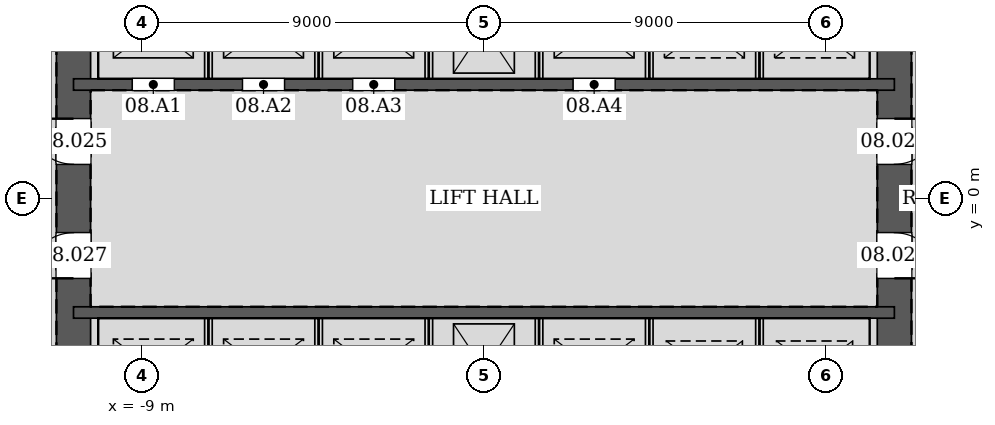
"""IFC4 building model, lengths in metres.
Left out: names, types, materials, properties, quantities, classifications, styles, units other than length and angle.
Written with IfcOpenShell. Run it as: python <this file> out.ifc"""

import sys

from ifc_helpers import new_model, si_unit, direction, frame, frame_2d, origin, place, context, subcontext, project, spatial, rectangle, extrude, element, fill, save


model = new_model("IFC4")
c1 = context("Model", 3, precision=1e-05, world=origin(), true_north=direction((0.0, 1.0)))
c2 = subcontext(c1, "Body", "Model", "MODEL_VIEW")
j1 = project(units=[si_unit("LENGTHUNIT", "METRE"), si_unit("PLANEANGLEUNIT", "RADIAN")], contexts=[c1])
p1 = place(None, origin())
s1 = spatial("IfcSite", under=j1, at=p1, CompositionType="ELEMENT")
p2 = place(p1, origin())
s2 = spatial("IfcBuilding", under=s1, at=p2, CompositionType="ELEMENT")
p3 = place(p2, frame((0.0, 0.0, 41.4)))
s3 = spatial("IfcBuildingStorey", under=s2, at=p3, CompositionType="ELEMENT", Elevation=41.4)
p4 = place(p3, frame((10.8, -10.8, 0.0), z_axis=(0.0, 0.0, 1.0), x_axis=(0.0, 1.0, 0.0)))
e1 = element("IfcWall", 1, at=p4, inside=s3, PredefinedType="SOLIDWALL", context=c2, shape_type="SweptSolid", body=[
    extrude(rectangle(XDim=21.6, YDim=0.9, at=frame_2d((10.8, 0.0))), origin(), (0.0, 0.0, 1.0), 4.2),
])
p5 = place(p4, frame((11.7, 0.0, 0.0)))
e2 = element("IfcOpeningElement", 2, at=p5, cuts=e1, PredefinedType="OPENING", context=c2, shape_type="SweptSolid", body=[
    extrude(rectangle(XDim=1.2, YDim=2.1, at=frame_2d((0.6, 1.05))), frame((0.0, 0.46, 0.0), z_axis=(0.0, -1.0, 0.0), x_axis=(1.0, 0.0, 0.0)), (0.0, 0.0, 1.0), 0.92),
])
p6 = place(p4, frame((8.7, 0.0, 0.0)))
e3 = element("IfcOpeningElement", 3, at=p6, cuts=e1, PredefinedType="OPENING", context=c2, shape_type="SweptSolid", body=[
    extrude(rectangle(XDim=1.2, YDim=2.1, at=frame_2d((0.6, 1.05))), frame((0.0, 0.46, 0.0), z_axis=(0.0, -1.0, 0.0), x_axis=(1.0, 0.0, 0.0)), (0.0, 0.0, 1.0), 0.92),
])
p7 = place(p3, frame((-10.8, 10.8, 0.0), z_axis=(0.0, 0.0, 1.0), x_axis=(0.0, -1.0, 0.0)))
e4 = element("IfcWall", 4, at=p7, inside=s3, PredefinedType="SOLIDWALL", context=c2, shape_type="SweptSolid", body=[
    extrude(rectangle(XDim=21.6, YDim=0.9, at=frame_2d((10.8, 0.0))), origin(), (0.0, 0.0, 1.0), 4.2),
])
p8 = place(p7, frame((8.7, 0.0, 0.0)))
e5 = element("IfcOpeningElement", 5, at=p8, cuts=e4, PredefinedType="OPENING", context=c2, shape_type="SweptSolid", body=[
    extrude(rectangle(XDim=1.2, YDim=2.1, at=frame_2d((0.6, 1.05))), frame((0.0, 0.46, 0.0), z_axis=(0.0, -1.0, 0.0), x_axis=(1.0, 0.0, 0.0)), (0.0, 0.0, 1.0), 0.92),
])
p9 = place(p7, frame((11.7, 0.0, 0.0)))
e6 = element("IfcOpeningElement", 6, at=p9, cuts=e4, PredefinedType="OPENING", context=c2, shape_type="SweptSolid", body=[
    extrude(rectangle(XDim=1.2, YDim=2.1, at=frame_2d((0.6, 1.05))), frame((0.0, 0.46, 0.0), z_axis=(0.0, -1.0, 0.0), x_axis=(1.0, 0.0, 0.0)), (0.0, 0.0, 1.0), 0.92),
])
p10 = place(p3, frame((-10.8, 3.0, 0.0), z_axis=(0.0, 0.0, 1.0), x_axis=(1.0, 0.0, 0.0)))
e7 = element("IfcWall", 7, at=p10, inside=s3, PredefinedType="SOLIDWALL", context=c2, shape_type="SweptSolid", body=[
    extrude(rectangle(XDim=21.6, YDim=0.3, at=frame_2d((10.8, 0.0))), origin(), (0.0, 0.0, 1.0), 4.2),
])
p11 = place(p10, frame((1.55, 0.0, 0.0)))
e8 = element("IfcOpeningElement", 8, at=p11, cuts=e7, PredefinedType="OPENING", context=c2, shape_type="SweptSolid", body=[
    extrude(rectangle(XDim=1.1, YDim=2.1, at=frame_2d((0.55, 1.05))), frame((0.0, 0.16, 0.0), z_axis=(0.0, -1.0, 0.0), x_axis=(1.0, 0.0, 0.0)), (0.0, 0.0, 1.0), 0.32),
])
p12 = place(p10, frame((4.45, 0.0, 0.0)))
e9 = element("IfcOpeningElement", 9, at=p12, cuts=e7, PredefinedType="OPENING", context=c2, shape_type="SweptSolid", body=[
    extrude(rectangle(XDim=1.1, YDim=2.1, at=frame_2d((0.55, 1.05))), frame((0.0, 0.16, 0.0), z_axis=(0.0, -1.0, 0.0), x_axis=(1.0, 0.0, 0.0)), (0.0, 0.0, 1.0), 0.32),
])
p13 = place(p10, frame((7.35, 0.0, 0.0)))
e10 = element("IfcOpeningElement", 10, at=p13, cuts=e7, PredefinedType="OPENING", context=c2, shape_type="SweptSolid", body=[
    extrude(rectangle(XDim=1.1, YDim=2.1, at=frame_2d((0.55, 1.05))), frame((0.0, 0.16, 0.0), z_axis=(0.0, -1.0, 0.0), x_axis=(1.0, 0.0, 0.0)), (0.0, 0.0, 1.0), 0.32),
])
p14 = place(p10, frame((13.15, 0.0, 0.0)))
e11 = element("IfcOpeningElement", 11, at=p14, cuts=e7, PredefinedType="OPENING", context=c2, shape_type="SweptSolid", body=[
    extrude(rectangle(XDim=1.1, YDim=2.1, at=frame_2d((0.55, 1.05))), frame((0.0, 0.16, 0.0), z_axis=(0.0, -1.0, 0.0), x_axis=(1.0, 0.0, 0.0)), (0.0, 0.0, 1.0), 0.32),
])
p15 = place(p3, frame((-10.8, -3.0, 0.0), z_axis=(0.0, 0.0, 1.0), x_axis=(1.0, 0.0, 0.0)))
e12 = element("IfcWall", 12, at=p15, inside=s3, PredefinedType="SOLIDWALL", context=c2, shape_type="SweptSolid", body=[
    extrude(rectangle(XDim=21.6, YDim=0.3, at=frame_2d((10.8, 0.0))), origin(), (0.0, 0.0, 1.0), 4.2),
])
for number, where, z_axis, x_axis in (
    (13, (-7.25, 3.15, 0.0), (0.0, 0.0, 1.0), (0.0, 1.0, 0.0)),
    (14, (-4.35, 3.15, 0.0), (0.0, 0.0, 1.0), (0.0, 1.0, 0.0)),
    (15, (-1.45, 3.15, 0.0), (0.0, 0.0, 1.0), (0.0, 1.0, 0.0)),
    (16, (1.45, 3.15, 0.0), (0.0, 0.0, 1.0), (0.0, 1.0, 0.0)),
    (17, (4.35, 3.15, 0.0), (0.0, 0.0, 1.0), (0.0, 1.0, 0.0)),
    (18, (7.25, 3.15, 0.0), (0.0, 0.0, 1.0), (0.0, 1.0, 0.0)),
    (19, (-7.25, -5.85, 0.0), (0.0, 0.0, 1.0), (0.0, 1.0, 0.0)),
    (20, (-4.35, -5.85, 0.0), (0.0, 0.0, 1.0), (0.0, 1.0, 0.0)),
    (21, (-1.45, -5.85, 0.0), (0.0, 0.0, 1.0), (0.0, 1.0, 0.0)),
    (22, (1.45, -5.85, 0.0), (0.0, 0.0, 1.0), (0.0, 1.0, 0.0)),
    (23, (4.35, -5.85, 0.0), (0.0, 0.0, 1.0), (0.0, 1.0, 0.0)),
    (24, (7.25, -5.85, 0.0), (0.0, 0.0, 1.0), (0.0, 1.0, 0.0)),
):
    element("IfcWall", number, at=place(p3, frame(where, z_axis=z_axis, x_axis=x_axis)), inside=s3, PredefinedType="PARTITIONING", context=c2, shape_type="SweptSolid", body=[
        extrude(rectangle(XDim=2.7, YDim=0.2, at=frame_2d((1.35, 0.0))), origin(), (0.0, 0.0, 1.0), 4.2),
    ])
p16 = place(p5, frame((1.2, 0.0, 0.0), z_axis=(0.0, 0.0, 1.0), x_axis=(-1.0, 0.0, 0.0)))
e25 = element("IfcDoor", 25, at=p16, inside=s3, OperationType="SINGLE_SWING_LEFT", PredefinedType="DOOR", context=c2, shape_type="SweptSolid", body=[
    extrude(rectangle(XDim=1.2, YDim=2.1, at=frame_2d((0.6, 1.05))), frame((0.0, 0.025, 0.0), z_axis=(0.0, -1.0, 0.0), x_axis=(1.0, 0.0, 0.0)), (0.0, 0.0, 1.0), 0.05),
])
fill(e2, e25)
p17 = place(p8, frame((1.2, 0.0, 0.0), z_axis=(0.0, 0.0, 1.0), x_axis=(-1.0, 0.0, 0.0)))
e26 = element("IfcDoor", 26, at=p17, inside=s3, OperationType="SINGLE_SWING_RIGHT", PredefinedType="DOOR", context=c2, shape_type="SweptSolid", body=[
    extrude(rectangle(XDim=1.2, YDim=2.1, at=frame_2d((0.6, 1.05))), frame((0.0, 0.025, 0.0), z_axis=(0.0, -1.0, 0.0), x_axis=(1.0, 0.0, 0.0)), (0.0, 0.0, 1.0), 0.05),
])
fill(e5, e26)
p18 = place(p6, frame((1.2, 0.0, 0.0), z_axis=(0.0, 0.0, 1.0), x_axis=(-1.0, 0.0, 0.0)))
e27 = element("IfcDoor", 27, at=p18, inside=s3, OperationType="SINGLE_SWING_RIGHT", PredefinedType="DOOR", context=c2, shape_type="SweptSolid", body=[
    extrude(rectangle(XDim=1.2, YDim=2.1, at=frame_2d((0.6, 1.05))), frame((0.0, 0.025, 0.0), z_axis=(0.0, -1.0, 0.0), x_axis=(1.0, 0.0, 0.0)), (0.0, 0.0, 1.0), 0.05),
])
fill(e3, e27)
p19 = place(p9, frame((1.2, 0.0, 0.0), z_axis=(0.0, 0.0, 1.0), x_axis=(-1.0, 0.0, 0.0)))
e28 = element("IfcDoor", 28, at=p19, inside=s3, OperationType="SINGLE_SWING_LEFT", PredefinedType="DOOR", context=c2, shape_type="SweptSolid", body=[
    extrude(rectangle(XDim=1.2, YDim=2.1, at=frame_2d((0.6, 1.05))), frame((0.0, 0.025, 0.0), z_axis=(0.0, -1.0, 0.0), x_axis=(1.0, 0.0, 0.0)), (0.0, 0.0, 1.0), 0.05),
])
fill(e6, e28)
p20 = place(p11, origin())
e29 = element("IfcDoor", 29, at=p20, inside=s3, OperationType="DOUBLE_DOOR_SLIDING", PredefinedType="DOOR", context=c2, shape_type="SweptSolid", body=[
    extrude(rectangle(XDim=1.1, YDim=2.1, at=frame_2d((0.55, 1.05))), frame((0.0, 0.025, 0.0), z_axis=(0.0, -1.0, 0.0), x_axis=(1.0, 0.0, 0.0)), (0.0, 0.0, 1.0), 0.05),
])
fill(e8, e29)
p21 = place(p12, origin())
e30 = element("IfcDoor", 30, at=p21, inside=s3, OperationType="DOUBLE_DOOR_SLIDING", PredefinedType="DOOR", context=c2, shape_type="SweptSolid", body=[
    extrude(rectangle(XDim=1.1, YDim=2.1, at=frame_2d((0.55, 1.05))), frame((0.0, 0.025, 0.0), z_axis=(0.0, -1.0, 0.0), x_axis=(1.0, 0.0, 0.0)), (0.0, 0.0, 1.0), 0.05),
])
fill(e9, e30)
p22 = place(p13, origin())
e31 = element("IfcDoor", 31, at=p22, inside=s3, OperationType="DOUBLE_DOOR_SLIDING", PredefinedType="DOOR", context=c2, shape_type="SweptSolid", body=[
    extrude(rectangle(XDim=1.1, YDim=2.1, at=frame_2d((0.55, 1.05))), frame((0.0, 0.025, 0.0), z_axis=(0.0, -1.0, 0.0), x_axis=(1.0, 0.0, 0.0)), (0.0, 0.0, 1.0), 0.05),
])
fill(e10, e31)
p23 = place(p14, origin())
e32 = element("IfcDoor", 32, at=p23, inside=s3, OperationType="DOUBLE_DOOR_SLIDING", PredefinedType="DOOR", context=c2, shape_type="SweptSolid", body=[
    extrude(rectangle(XDim=1.1, YDim=2.1, at=frame_2d((0.55, 1.05))), frame((0.0, 0.025, 0.0), z_axis=(0.0, -1.0, 0.0), x_axis=(1.0, 0.0, 0.0)), (0.0, 0.0, 1.0), 0.05),
])
fill(e11, e32)
save(model, sys.argv[1])
